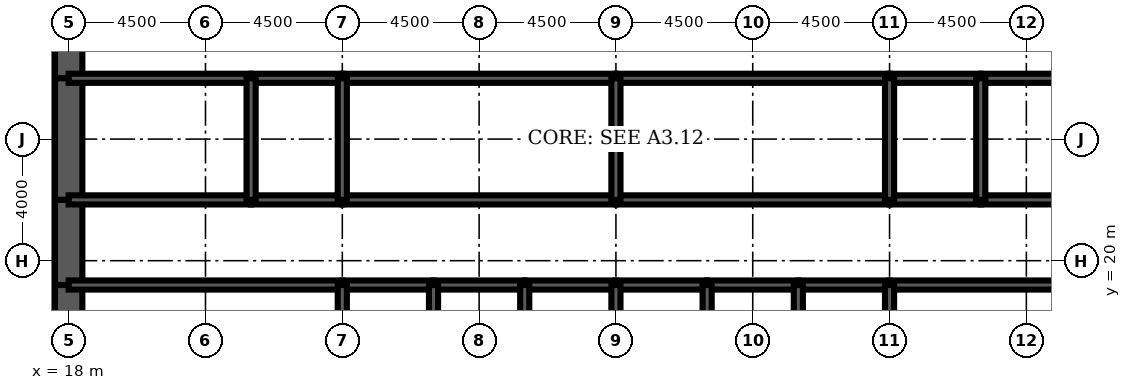
"""IFC4 building model, lengths in metres.
Left out: names, types, materials, properties, quantities, classifications, styles, units other than length and angle.
Written with IfcOpenShell. Run it as: python <this file> out.ifc"""

import sys

from ifc_helpers import new_model, si_unit, direction, frame, frame_2d, origin, place, context, subcontext, project, spatial, rectangle, extrude, element, fill, save


model = new_model("IFC4")
c1 = context("Model", 3, precision=1e-05, world=origin(), true_north=direction((0.0, 1.0)))
c2 = subcontext(c1, "Body", "Model", "MODEL_VIEW")
j1 = project(units=[si_unit("LENGTHUNIT", "METRE"), si_unit("PLANEANGLEUNIT", "RADIAN")], contexts=[c1])
p1 = place(None, origin())
s1 = spatial("IfcSite", under=j1, at=p1, CompositionType="ELEMENT")
p2 = place(p1, origin())
s2 = spatial("IfcBuilding", under=s1, at=p2, CompositionType="ELEMENT")
p3 = place(p2, frame((0.0, 0.0, 50.0)))
s3 = spatial("IfcBuildingStorey", under=s2, at=p3, CompositionType="ELEMENT", Elevation=50.0)
p4 = place(p3, frame((18.0, 28.8, 0.0), z_axis=(0.0, 0.0, 1.0), x_axis=(0.0, -1.0, 0.0)))
e1 = element("IfcWall", 1, at=p4, inside=s3, PredefinedType="SHEAR", context=c2, shape_type="SweptSolid", body=[
    extrude(rectangle(XDim=2.8, YDim=0.9, at=frame_2d((1.4, 0.0))), origin(), (0.0, 0.0, 1.0), 4.5),
])
p5 = place(p4, frame((0.4, 0.0, 0.0)))
e2 = element("IfcOpeningElement", 2, at=p5, cuts=e1, PredefinedType="OPENING", context=c2, shape_type="SweptSolid", body=[
    extrude(rectangle(XDim=1.8, YDim=2.1, at=frame_2d((0.9, 1.05))), frame((0.0, 0.46, 0.0), z_axis=(0.0, -1.0, 0.0), x_axis=(1.0, 0.0, 0.0)), (0.0, 0.0, 1.0), 0.92),
])
p6 = place(p3, frame((18.0, 26.0, 0.0), z_axis=(0.0, 0.0, 1.0), x_axis=(0.0, -1.0, 0.0)))
e3 = element("IfcWall", 3, at=p6, inside=s3, PredefinedType="SHEAR", context=c2, shape_type="SweptSolid", body=[
    extrude(rectangle(XDim=4.0, YDim=0.9, at=frame_2d((2.0, 0.0))), origin(), (0.0, 0.0, 1.0), 4.5),
])
p7 = place(p3, frame((18.0, 22.0, 0.0), z_axis=(0.0, 0.0, 1.0), x_axis=(0.0, -1.0, 0.0)))
e4 = element("IfcWall", 4, at=p7, inside=s3, PredefinedType="SHEAR", context=c2, shape_type="SweptSolid", body=[
    extrude(rectangle(XDim=2.8, YDim=0.9, at=frame_2d((1.4, 0.0))), origin(), (0.0, 0.0, 1.0), 4.5),
])
p8 = place(p7, frame((0.6, 0.0, 0.0)))
e5 = element("IfcOpeningElement", 5, at=p8, cuts=e4, PredefinedType="OPENING", context=c2, shape_type="SweptSolid", body=[
    extrude(rectangle(XDim=1.8, YDim=2.1, at=frame_2d((0.9, 1.05))), frame((0.0, 0.46, 0.0), z_axis=(0.0, -1.0, 0.0), x_axis=(1.0, 0.0, 0.0)), (0.0, 0.0, 1.0), 0.92),
])
p9 = place(p3, frame((18.0, 19.2, 0.0), z_axis=(0.0, 0.0, 1.0), x_axis=(0.0, -1.0, 0.0)))
e6 = element("IfcWall", 6, at=p9, inside=s3, PredefinedType="SHEAR", context=c2, shape_type="SweptSolid", body=[
    extrude(rectangle(XDim=3.2, YDim=0.9, at=frame_2d((1.6, 0.0))), origin(), (0.0, 0.0, 1.0), 4.5),
])
p10 = place(p3, frame((18.0, 19.2, 0.0), z_axis=(0.0, 0.0, 1.0), x_axis=(1.0, 0.0, 0.0)))
e7 = element("IfcWall", 7, at=p10, inside=s3, PredefinedType="SOLIDWALL", context=c2, shape_type="SweptSolid", body=[
    extrude(rectangle(XDim=9.0, YDim=0.3, at=frame_2d((4.5, 0.0))), origin(), (0.0, 0.0, 1.0), 4.5),
])
p11 = place(p10, frame((0.65, 0.0, 0.0)))
e8 = element("IfcOpeningElement", 8, at=p11, cuts=e7, PredefinedType="OPENING", context=c2, shape_type="SweptSolid", body=[
    extrude(rectangle(XDim=1.0, YDim=2.1, at=frame_2d((0.5, 1.05))), frame((0.0, 0.16, 0.0), z_axis=(0.0, -1.0, 0.0), x_axis=(1.0, 0.0, 0.0)), (0.0, 0.0, 1.0), 0.32),
])
p12 = place(p3, frame((27.0, 19.2, 0.0), z_axis=(0.0, 0.0, 1.0), x_axis=(1.0, 0.0, 0.0)))
e9 = element("IfcWall", 9, at=p12, inside=s3, PredefinedType="SOLIDWALL", context=c2, shape_type="SweptSolid", body=[
    extrude(rectangle(XDim=3.0, YDim=0.3, at=frame_2d((1.5, 0.0))), origin(), (0.0, 0.0, 1.0), 4.5),
])
p13 = place(p12, frame((0.95, 0.0, 0.0)))
e10 = element("IfcOpeningElement", 10, at=p13, cuts=e9, PredefinedType="OPENING", context=c2, shape_type="SweptSolid", body=[
    extrude(rectangle(XDim=1.1, YDim=2.2, at=frame_2d((0.55, 1.1))), frame((0.0, 0.16, 0.0), z_axis=(0.0, -1.0, 0.0), x_axis=(1.0, 0.0, 0.0)), (0.0, 0.0, 1.0), 0.32),
])
p14 = place(p3, frame((30.0, 19.2, 0.0), z_axis=(0.0, 0.0, 1.0), x_axis=(1.0, 0.0, 0.0)))
e11 = element("IfcWall", 11, at=p14, inside=s3, PredefinedType="SOLIDWALL", context=c2, shape_type="SweptSolid", body=[
    extrude(rectangle(XDim=3.0, YDim=0.3, at=frame_2d((1.5, 0.0))), origin(), (0.0, 0.0, 1.0), 4.5),
])
p15 = place(p14, frame((0.95, 0.0, 0.0)))
e12 = element("IfcOpeningElement", 12, at=p15, cuts=e11, PredefinedType="OPENING", context=c2, shape_type="SweptSolid", body=[
    extrude(rectangle(XDim=1.1, YDim=2.2, at=frame_2d((0.55, 1.1))), frame((0.0, 0.16, 0.0), z_axis=(0.0, -1.0, 0.0), x_axis=(1.0, 0.0, 0.0)), (0.0, 0.0, 1.0), 0.32),
])
p16 = place(p3, frame((33.0, 19.2, 0.0), z_axis=(0.0, 0.0, 1.0), x_axis=(1.0, 0.0, 0.0)))
e13 = element("IfcWall", 13, at=p16, inside=s3, PredefinedType="SOLIDWALL", context=c2, shape_type="SweptSolid", body=[
    extrude(rectangle(XDim=3.0, YDim=0.3, at=frame_2d((1.5, 0.0))), origin(), (0.0, 0.0, 1.0), 4.5),
])
p17 = place(p16, frame((0.95, 0.0, 0.0)))
e14 = element("IfcOpeningElement", 14, at=p17, cuts=e13, PredefinedType="OPENING", context=c2, shape_type="SweptSolid", body=[
    extrude(rectangle(XDim=1.1, YDim=2.2, at=frame_2d((0.55, 1.1))), frame((0.0, 0.16, 0.0), z_axis=(0.0, -1.0, 0.0), x_axis=(1.0, 0.0, 0.0)), (0.0, 0.0, 1.0), 0.32),
])
p18 = place(p3, frame((36.0, 19.2, 0.0), z_axis=(0.0, 0.0, 1.0), x_axis=(1.0, 0.0, 0.0)))
e15 = element("IfcWall", 15, at=p18, inside=s3, PredefinedType="SOLIDWALL", context=c2, shape_type="SweptSolid", body=[
    extrude(rectangle(XDim=3.0, YDim=0.3, at=frame_2d((1.5, 0.0))), origin(), (0.0, 0.0, 1.0), 4.5),
])
p19 = place(p18, frame((0.95, 0.0, 0.0)))
e16 = element("IfcOpeningElement", 16, at=p19, cuts=e15, PredefinedType="OPENING", context=c2, shape_type="SweptSolid", body=[
    extrude(rectangle(XDim=1.1, YDim=2.2, at=frame_2d((0.55, 1.1))), frame((0.0, 0.16, 0.0), z_axis=(0.0, -1.0, 0.0), x_axis=(1.0, 0.0, 0.0)), (0.0, 0.0, 1.0), 0.32),
])
for number, where, z_axis, x_axis in (
    (17, (39.0, 19.2, 0.0), (0.0, 0.0, 1.0), (1.0, 0.0, 0.0)),
    (18, (42.0, 19.2, 0.0), (0.0, 0.0, 1.0), (1.0, 0.0, 0.0)),
):
    element("IfcWall", number, at=place(p3, frame(where, z_axis=z_axis, x_axis=x_axis)), inside=s3, PredefinedType="SOLIDWALL", context=c2, shape_type="SweptSolid", body=[
        extrude(rectangle(XDim=3.0, YDim=0.3, at=frame_2d((1.5, 0.0))), origin(), (0.0, 0.0, 1.0), 4.5),
    ])
p20 = place(p3, frame((45.0, 19.2, 0.0), z_axis=(0.0, 0.0, 1.0), x_axis=(1.0, 0.0, 0.0)))
e19 = element("IfcWall", 19, at=p20, inside=s3, PredefinedType="SOLIDWALL", context=c2, shape_type="SweptSolid", body=[
    extrude(rectangle(XDim=9.0, YDim=0.3, at=frame_2d((4.5, 0.0))), origin(), (0.0, 0.0, 1.0), 4.5),
])
p21 = place(p20, frame((7.35, 0.0, 0.0)))
e20 = element("IfcOpeningElement", 20, at=p21, cuts=e19, PredefinedType="OPENING", context=c2, shape_type="SweptSolid", body=[
    extrude(rectangle(XDim=1.0, YDim=2.1, at=frame_2d((0.5, 1.05))), frame((0.0, 0.16, 0.0), z_axis=(0.0, -1.0, 0.0), x_axis=(1.0, 0.0, 0.0)), (0.0, 0.0, 1.0), 0.32),
])
p22 = place(p3, frame((18.0, 22.0, 0.0), z_axis=(0.0, 0.0, 1.0), x_axis=(1.0, 0.0, 0.0)))
e21 = element("IfcWall", 21, at=p22, inside=s3, PredefinedType="SOLIDWALL", context=c2, shape_type="SweptSolid", body=[
    extrude(rectangle(XDim=6.0, YDim=0.3, at=frame_2d((3.0, 0.0))), origin(), (0.0, 0.0, 1.0), 4.5),
])
p23 = place(p22, frame((2.0, 0.0, 0.0)))
e22 = element("IfcOpeningElement", 22, at=p23, cuts=e21, PredefinedType="OPENING", context=c2, shape_type="SweptSolid", body=[
    extrude(rectangle(XDim=1.0, YDim=2.1, at=frame_2d((0.5, 1.05))), frame((0.0, 0.16, 0.0), z_axis=(0.0, -1.0, 0.0), x_axis=(1.0, 0.0, 0.0)), (0.0, 0.0, 1.0), 0.32),
])
p24 = place(p3, frame((24.0, 22.0, 0.0), z_axis=(0.0, 0.0, 1.0), x_axis=(1.0, 0.0, 0.0)))
e23 = element("IfcWall", 23, at=p24, inside=s3, PredefinedType="SOLIDWALL", context=c2, shape_type="SweptSolid", body=[
    extrude(rectangle(XDim=3.0, YDim=0.3, at=frame_2d((1.5, 0.0))), origin(), (0.0, 0.0, 1.0), 4.5),
])
p25 = place(p24, frame((1.0, 0.0, 0.0)))
e24 = element("IfcOpeningElement", 24, at=p25, cuts=e23, PredefinedType="OPENING", context=c2, shape_type="SweptSolid", body=[
    extrude(rectangle(XDim=1.0, YDim=2.1, at=frame_2d((0.5, 1.05))), frame((0.0, 0.16, 0.0), z_axis=(0.0, -1.0, 0.0), x_axis=(1.0, 0.0, 0.0)), (0.0, 0.0, 1.0), 0.32),
])
p26 = place(p3, frame((27.0, 22.0, 0.0), z_axis=(0.0, 0.0, 1.0), x_axis=(1.0, 0.0, 0.0)))
e25 = element("IfcWall", 25, at=p26, inside=s3, PredefinedType="SOLIDWALL", context=c2, shape_type="SweptSolid", body=[
    extrude(rectangle(XDim=9.0, YDim=0.3, at=frame_2d((4.5, 0.0))), origin(), (0.0, 0.0, 1.0), 4.5),
])
p27 = place(p26, frame((4.0, 0.0, 0.0)))
e26 = element("IfcOpeningElement", 26, at=p27, cuts=e25, PredefinedType="OPENING", context=c2, shape_type="SweptSolid", body=[
    extrude(rectangle(XDim=1.0, YDim=2.1, at=frame_2d((0.5, 1.05))), frame((0.0, 0.16, 0.0), z_axis=(0.0, -1.0, 0.0), x_axis=(1.0, 0.0, 0.0)), (0.0, 0.0, 1.0), 0.32),
])
p28 = place(p3, frame((36.0, 22.0, 0.0), z_axis=(0.0, 0.0, 1.0), x_axis=(1.0, 0.0, 0.0)))
e27 = element("IfcWall", 27, at=p28, inside=s3, PredefinedType="SOLIDWALL", context=c2, shape_type="SweptSolid", body=[
    extrude(rectangle(XDim=9.0, YDim=0.3, at=frame_2d((4.5, 0.0))), origin(), (0.0, 0.0, 1.0), 4.5),
])
p29 = place(p28, frame((4.0, 0.0, 0.0)))
e28 = element("IfcOpeningElement", 28, at=p29, cuts=e27, PredefinedType="OPENING", context=c2, shape_type="SweptSolid", body=[
    extrude(rectangle(XDim=1.0, YDim=2.1, at=frame_2d((0.5, 1.05))), frame((0.0, 0.16, 0.0), z_axis=(0.0, -1.0, 0.0), x_axis=(1.0, 0.0, 0.0)), (0.0, 0.0, 1.0), 0.32),
])
p30 = place(p3, frame((45.0, 22.0, 0.0), z_axis=(0.0, 0.0, 1.0), x_axis=(1.0, 0.0, 0.0)))
e29 = element("IfcWall", 29, at=p30, inside=s3, PredefinedType="SOLIDWALL", context=c2, shape_type="SweptSolid", body=[
    extrude(rectangle(XDim=3.0, YDim=0.3, at=frame_2d((1.5, 0.0))), origin(), (0.0, 0.0, 1.0), 4.5),
])
p31 = place(p30, frame((1.0, 0.0, 0.0)))
e30 = element("IfcOpeningElement", 30, at=p31, cuts=e29, PredefinedType="OPENING", context=c2, shape_type="SweptSolid", body=[
    extrude(rectangle(XDim=1.0, YDim=2.1, at=frame_2d((0.5, 1.05))), frame((0.0, 0.16, 0.0), z_axis=(0.0, -1.0, 0.0), x_axis=(1.0, 0.0, 0.0)), (0.0, 0.0, 1.0), 0.32),
])
p32 = place(p3, frame((48.0, 22.0, 0.0), z_axis=(0.0, 0.0, 1.0), x_axis=(1.0, 0.0, 0.0)))
e31 = element("IfcWall", 31, at=p32, inside=s3, PredefinedType="SOLIDWALL", context=c2, shape_type="SweptSolid", body=[
    extrude(rectangle(XDim=6.0, YDim=0.3, at=frame_2d((3.0, 0.0))), origin(), (0.0, 0.0, 1.0), 4.5),
])
p33 = place(p32, frame((2.0, 0.0, 0.0)))
e32 = element("IfcOpeningElement", 32, at=p33, cuts=e31, PredefinedType="OPENING", context=c2, shape_type="SweptSolid", body=[
    extrude(rectangle(XDim=1.0, YDim=2.1, at=frame_2d((0.5, 1.05))), frame((0.0, 0.16, 0.0), z_axis=(0.0, -1.0, 0.0), x_axis=(1.0, 0.0, 0.0)), (0.0, 0.0, 1.0), 0.32),
])
p34 = place(p32, frame((4.3, 0.0, 0.0)))
e33 = element("IfcOpeningElement", 33, at=p34, cuts=e31, PredefinedType="OPENING", context=c2, shape_type="SweptSolid", body=[
    extrude(rectangle(XDim=1.0, YDim=2.1, at=frame_2d((0.5, 1.05))), frame((0.0, 0.16, 0.0), z_axis=(0.0, -1.0, 0.0), x_axis=(1.0, 0.0, 0.0)), (0.0, 0.0, 1.0), 0.32),
])
p35 = place(p3, frame((18.0, 26.0, 0.0), z_axis=(0.0, 0.0, 1.0), x_axis=(1.0, 0.0, 0.0)))
e34 = element("IfcWall", 34, at=p35, inside=s3, PredefinedType="SOLIDWALL", context=c2, shape_type="SweptSolid", body=[
    extrude(rectangle(XDim=6.0, YDim=0.3, at=frame_2d((3.0, 0.0))), origin(), (0.0, 0.0, 1.0), 4.5),
])
p36 = place(p3, frame((24.0, 26.0, 0.0), z_axis=(0.0, 0.0, 1.0), x_axis=(1.0, 0.0, 0.0)))
e35 = element("IfcWall", 35, at=p36, inside=s3, PredefinedType="SOLIDWALL", context=c2, shape_type="SweptSolid", body=[
    extrude(rectangle(XDim=3.0, YDim=0.3, at=frame_2d((1.5, 0.0))), origin(), (0.0, 0.0, 1.0), 4.5),
])
for number, where, z_axis, x_axis in (
    (36, (27.0, 26.0, 0.0), (0.0, 0.0, 1.0), (1.0, 0.0, 0.0)),
    (37, (36.0, 26.0, 0.0), (0.0, 0.0, 1.0), (1.0, 0.0, 0.0)),
):
    element("IfcWall", number, at=place(p3, frame(where, z_axis=z_axis, x_axis=x_axis)), inside=s3, PredefinedType="SOLIDWALL", context=c2, shape_type="SweptSolid", body=[
        extrude(rectangle(XDim=9.0, YDim=0.3, at=frame_2d((4.5, 0.0))), origin(), (0.0, 0.0, 1.0), 4.5),
    ])
p37 = place(p3, frame((45.0, 26.0, 0.0), z_axis=(0.0, 0.0, 1.0), x_axis=(1.0, 0.0, 0.0)))
e38 = element("IfcWall", 38, at=p37, inside=s3, PredefinedType="SOLIDWALL", context=c2, shape_type="SweptSolid", body=[
    extrude(rectangle(XDim=3.0, YDim=0.3, at=frame_2d((1.5, 0.0))), origin(), (0.0, 0.0, 1.0), 4.5),
])
p38 = place(p3, frame((48.0, 26.0, 0.0), z_axis=(0.0, 0.0, 1.0), x_axis=(1.0, 0.0, 0.0)))
e39 = element("IfcWall", 39, at=p38, inside=s3, PredefinedType="SOLIDWALL", context=c2, shape_type="SweptSolid", body=[
    extrude(rectangle(XDim=6.0, YDim=0.3, at=frame_2d((3.0, 0.0))), origin(), (0.0, 0.0, 1.0), 4.5),
])
for number, where, z_axis, x_axis in (
    (40, (27.0, 16.0, 0.0), (0.0, 0.0, 1.0), (0.0, 1.0, 0.0)),
    (41, (30.0, 16.0, 0.0), (0.0, 0.0, 1.0), (0.0, 1.0, 0.0)),
    (42, (33.0, 16.0, 0.0), (0.0, 0.0, 1.0), (0.0, 1.0, 0.0)),
    (43, (36.0, 16.0, 0.0), (0.0, 0.0, 1.0), (0.0, 1.0, 0.0)),
    (44, (39.0, 16.0, 0.0), (0.0, 0.0, 1.0), (0.0, 1.0, 0.0)),
    (45, (42.0, 16.0, 0.0), (0.0, 0.0, 1.0), (0.0, 1.0, 0.0)),
    (46, (45.0, 16.0, 0.0), (0.0, 0.0, 1.0), (0.0, 1.0, 0.0)),
):
    element("IfcWall", number, at=place(p3, frame(where, z_axis=z_axis, x_axis=x_axis)), inside=s3, PredefinedType="SOLIDWALL", context=c2, shape_type="SweptSolid", body=[
        extrude(rectangle(XDim=3.2, YDim=0.3, at=frame_2d((1.6, 0.0))), origin(), (0.0, 0.0, 1.0), 4.5),
    ])
for number, where, z_axis, x_axis in (
    (47, (24.0, 22.0, 0.0), (0.0, 0.0, 1.0), (0.0, 1.0, 0.0)),
    (48, (27.0, 22.0, 0.0), (0.0, 0.0, 1.0), (0.0, 1.0, 0.0)),
    (49, (36.0, 22.0, 0.0), (0.0, 0.0, 1.0), (0.0, 1.0, 0.0)),
    (50, (45.0, 22.0, 0.0), (0.0, 0.0, 1.0), (0.0, 1.0, 0.0)),
    (51, (48.0, 22.0, 0.0), (0.0, 0.0, 1.0), (0.0, 1.0, 0.0)),
):
    element("IfcWall", number, at=place(p3, frame(where, z_axis=z_axis, x_axis=x_axis)), inside=s3, PredefinedType="SOLIDWALL", context=c2, shape_type="SweptSolid", body=[
        extrude(rectangle(XDim=4.0, YDim=0.3, at=frame_2d((2.0, 0.0))), origin(), (0.0, 0.0, 1.0), 4.5),
    ])
p39 = place(p3, frame((38.0, 22.15, 0.0), z_axis=(0.0, 0.0, 1.0), x_axis=(0.0, 1.0, 0.0)))
e52 = element("IfcWall", 52, at=p39, inside=s3, PredefinedType="PARTITIONING", context=c2, shape_type="SweptSolid", body=[
    extrude(rectangle(XDim=3.7, YDim=0.15, at=frame_2d((1.85, 0.0))), origin(), (0.0, 0.0, 1.0), 3.0),
])
p40 = place(p39, frame((2.2, 0.0, 0.0)))
e53 = element("IfcOpeningElement", 53, at=p40, cuts=e52, PredefinedType="OPENING", context=c2, shape_type="SweptSolid", body=[
    extrude(rectangle(XDim=1.0, YDim=2.1, at=frame_2d((0.5, 1.05))), frame((0.0, 0.085, 0.0), z_axis=(0.0, -1.0, 0.0), x_axis=(1.0, 0.0, 0.0)), (0.0, 0.0, 1.0), 0.17),
])
p41 = place(p3, frame((49.4, 19.35, 0.0), z_axis=(0.0, 0.0, 1.0), x_axis=(0.0, 1.0, 0.0)))
e54 = element("IfcWall", 54, at=p41, inside=s3, PredefinedType="PARTITIONING", context=c2, shape_type="SweptSolid", body=[
    extrude(rectangle(XDim=2.5, YDim=0.15, at=frame_2d((1.25, 0.0))), origin(), (0.0, 0.0, 1.0), 3.0),
])
p42 = place(p41, frame((1.15, 0.0, 0.0)))
e55 = element("IfcOpeningElement", 55, at=p42, cuts=e54, PredefinedType="OPENING", context=c2, shape_type="SweptSolid", body=[
    extrude(rectangle(XDim=1.0, YDim=2.1, at=frame_2d((0.5, 1.05))), frame((0.0, 0.085, 0.0), z_axis=(0.0, -1.0, 0.0), x_axis=(1.0, 0.0, 0.0)), (0.0, 0.0, 1.0), 0.17),
])
p43 = place(p40, origin())
e56 = element("IfcDoor", 56, at=p43, inside=s3, OperationType="SINGLE_SWING_RIGHT", PredefinedType="DOOR", context=c2, shape_type="SweptSolid", body=[
    extrude(rectangle(XDim=1.0, YDim=2.1, at=frame_2d((0.5, 1.05))), frame((0.0, 0.025, 0.0), z_axis=(0.0, -1.0, 0.0), x_axis=(1.0, 0.0, 0.0)), (0.0, 0.0, 1.0), 0.05),
])
fill(e53, e56)
p44 = place(p42, origin())
e57 = element("IfcDoor", 57, at=p44, inside=s3, OperationType="SINGLE_SWING_RIGHT", PredefinedType="DOOR", context=c2, shape_type="SweptSolid", body=[
    extrude(rectangle(XDim=1.0, YDim=2.1, at=frame_2d((0.5, 1.05))), frame((0.0, 0.025, 0.0), z_axis=(0.0, -1.0, 0.0), x_axis=(1.0, 0.0, 0.0)), (0.0, 0.0, 1.0), 0.05),
])
fill(e55, e57)
p45 = place(p13, origin())
e58 = element("IfcDoor", 58, at=p45, inside=s3, OperationType="DOUBLE_DOOR_SLIDING", PredefinedType="USERDEFINED", context=c2, shape_type="SweptSolid", body=[
    extrude(rectangle(XDim=1.1, YDim=2.2, at=frame_2d((0.55, 1.1))), frame((0.0, 0.025, 0.0), z_axis=(0.0, -1.0, 0.0), x_axis=(1.0, 0.0, 0.0)), (0.0, 0.0, 1.0), 0.05),
])
fill(e10, e58)
p46 = place(p15, origin())
e59 = element("IfcDoor", 59, at=p46, inside=s3, OperationType="DOUBLE_DOOR_SLIDING", PredefinedType="USERDEFINED", context=c2, shape_type="SweptSolid", body=[
    extrude(rectangle(XDim=1.1, YDim=2.2, at=frame_2d((0.55, 1.1))), frame((0.0, 0.025, 0.0), z_axis=(0.0, -1.0, 0.0), x_axis=(1.0, 0.0, 0.0)), (0.0, 0.0, 1.0), 0.05),
])
fill(e12, e59)
p47 = place(p17, origin())
e60 = element("IfcDoor", 60, at=p47, inside=s3, OperationType="DOUBLE_DOOR_SLIDING", PredefinedType="USERDEFINED", context=c2, shape_type="SweptSolid", body=[
    extrude(rectangle(XDim=1.1, YDim=2.2, at=frame_2d((0.55, 1.1))), frame((0.0, 0.025, 0.0), z_axis=(0.0, -1.0, 0.0), x_axis=(1.0, 0.0, 0.0)), (0.0, 0.0, 1.0), 0.05),
])
fill(e14, e60)
p48 = place(p19, origin())
e61 = element("IfcDoor", 61, at=p48, inside=s3, OperationType="DOUBLE_DOOR_SLIDING", PredefinedType="USERDEFINED", context=c2, shape_type="SweptSolid", body=[
    extrude(rectangle(XDim=1.1, YDim=2.2, at=frame_2d((0.55, 1.1))), frame((0.0, 0.025, 0.0), z_axis=(0.0, -1.0, 0.0), x_axis=(1.0, 0.0, 0.0)), (0.0, 0.0, 1.0), 0.05),
])
fill(e16, e61)
p49 = place(p11, origin())
e62 = element("IfcDoor", 62, at=p49, inside=s3, OperationType="SINGLE_SWING_LEFT", PredefinedType="DOOR", context=c2, shape_type="SweptSolid", body=[
    extrude(rectangle(XDim=1.0, YDim=2.1, at=frame_2d((0.5, 1.05))), frame((0.0, 0.025, 0.0), z_axis=(0.0, -1.0, 0.0), x_axis=(1.0, 0.0, 0.0)), (0.0, 0.0, 1.0), 0.05),
])
fill(e8, e62)
p50 = place(p8, origin())
e63 = element("IfcDoor", 63, at=p50, inside=s3, OperationType="SINGLE_SWING_LEFT", PredefinedType="DOOR", context=c2, shape_type="SweptSolid", body=[
    extrude(rectangle(XDim=1.8, YDim=2.1, at=frame_2d((0.9, 1.05))), frame((0.0, 0.45, 0.0), z_axis=(0.0, -1.0, 0.0), x_axis=(1.0, 0.0, 0.0)), (0.0, 0.0, 1.0), 0.899),
])
fill(e5, e63)
p51 = place(p5, origin())
e64 = element("IfcDoor", 64, at=p51, inside=s3, OperationType="SINGLE_SWING_LEFT", PredefinedType="DOOR", context=c2, shape_type="SweptSolid", body=[
    extrude(rectangle(XDim=1.8, YDim=2.1, at=frame_2d((0.9, 1.05))), frame((0.0, 0.45, 0.0), z_axis=(0.0, -1.0, 0.0), x_axis=(1.0, 0.0, 0.0)), (0.0, 0.0, 1.0), 0.899),
])
fill(e2, e64)
p52 = place(p23, origin())
e65 = element("IfcDoor", 65, at=p52, inside=s3, OperationType="SINGLE_SWING_LEFT", PredefinedType="DOOR", context=c2, shape_type="SweptSolid", body=[
    extrude(rectangle(XDim=1.0, YDim=2.1, at=frame_2d((0.5, 1.05))), frame((0.0, 0.025, 0.0), z_axis=(0.0, -1.0, 0.0), x_axis=(1.0, 0.0, 0.0)), (0.0, 0.0, 1.0), 0.05),
])
fill(e22, e65)
p53 = place(p25, origin())
e66 = element("IfcDoor", 66, at=p53, inside=s3, OperationType="SINGLE_SWING_LEFT", PredefinedType="DOOR", context=c2, shape_type="SweptSolid", body=[
    extrude(rectangle(XDim=1.0, YDim=2.1, at=frame_2d((0.5, 1.05))), frame((0.0, 0.025, 0.0), z_axis=(0.0, -1.0, 0.0), x_axis=(1.0, 0.0, 0.0)), (0.0, 0.0, 1.0), 0.05),
])
fill(e24, e66)
p54 = place(p27, origin())
e67 = element("IfcDoor", 67, at=p54, inside=s3, OperationType="SINGLE_SWING_LEFT", PredefinedType="DOOR", context=c2, shape_type="SweptSolid", body=[
    extrude(rectangle(XDim=1.0, YDim=2.1, at=frame_2d((0.5, 1.05))), frame((0.0, 0.025, 0.0), z_axis=(0.0, -1.0, 0.0), x_axis=(1.0, 0.0, 0.0)), (0.0, 0.0, 1.0), 0.05),
])
fill(e26, e67)
p55 = place(p29, origin())
e68 = element("IfcDoor", 68, at=p55, inside=s3, OperationType="SINGLE_SWING_LEFT", PredefinedType="DOOR", context=c2, shape_type="SweptSolid", body=[
    extrude(rectangle(XDim=1.0, YDim=2.1, at=frame_2d((0.5, 1.05))), frame((0.0, 0.025, 0.0), z_axis=(0.0, -1.0, 0.0), x_axis=(1.0, 0.0, 0.0)), (0.0, 0.0, 1.0), 0.05),
])
fill(e28, e68)
p56 = place(p31, origin())
e69 = element("IfcDoor", 69, at=p56, inside=s3, OperationType="SINGLE_SWING_LEFT", PredefinedType="DOOR", context=c2, shape_type="SweptSolid", body=[
    extrude(rectangle(XDim=1.0, YDim=2.1, at=frame_2d((0.5, 1.05))), frame((0.0, 0.025, 0.0), z_axis=(0.0, -1.0, 0.0), x_axis=(1.0, 0.0, 0.0)), (0.0, 0.0, 1.0), 0.05),
])
fill(e30, e69)
p57 = place(p33, origin())
e70 = element("IfcDoor", 70, at=p57, inside=s3, OperationType="SINGLE_SWING_LEFT", PredefinedType="DOOR", context=c2, shape_type="SweptSolid", body=[
    extrude(rectangle(XDim=1.0, YDim=2.1, at=frame_2d((0.5, 1.05))), frame((0.0, 0.025, 0.0), z_axis=(0.0, -1.0, 0.0), x_axis=(1.0, 0.0, 0.0)), (0.0, 0.0, 1.0), 0.05),
])
fill(e32, e70)
save(model, sys.argv[1])
